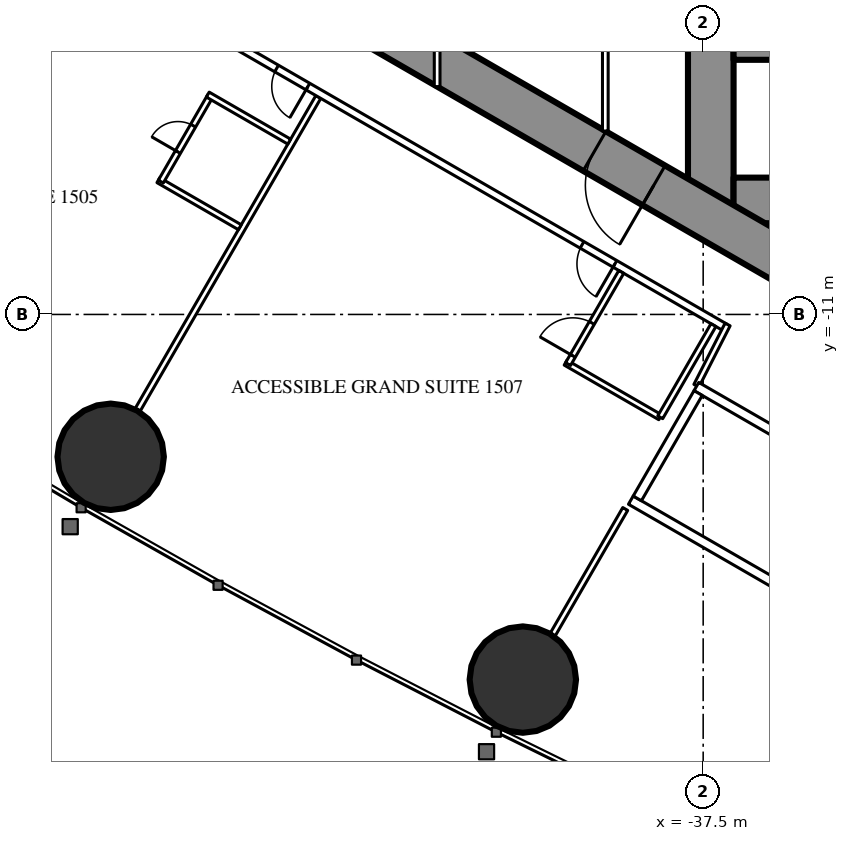
"""IFC4 building model, lengths in metres.
Left out: names, types, materials, properties, quantities, classifications, styles, units other than length and angle.
Written with IfcOpenShell. Run it as: python <this file> out.ifc"""

import sys

from ifc_helpers import new_model, si_unit, direction, frame, frame_2d, origin, origin_2d, place, context, subcontext, project, spatial, rectangle, hollow_circle, extrude, element, fill, save


model = new_model("IFC4")
c1 = context("Model", 3, precision=1e-05, world=origin(), true_north=direction((0.0, 1.0)))
c2 = subcontext(c1, "Body", "Model", "MODEL_VIEW")
j1 = project(units=[si_unit("LENGTHUNIT", "METRE"), si_unit("PLANEANGLEUNIT", "RADIAN")], contexts=[c1])
p1 = place(None, origin())
s1 = spatial("IfcSite", under=j1, at=p1, CompositionType="ELEMENT")
p2 = place(p1, origin())
s2 = spatial("IfcBuilding", under=s1, at=p2, CompositionType="ELEMENT")
p3 = place(p2, frame((0.0, 0.0, 60.0)))
s3 = spatial("IfcBuildingStorey", under=s2, at=p3, CompositionType="ELEMENT", Elevation=60.0)
for number, where, z_axis, x_axis in (
    (1, (-53.09, -14.745, 0.0), (0.0, 0.0, 1.0), (1.0, 0.0, 0.0)),
    (2, (-42.245, -20.607, 0.0), (0.0, 0.0, 1.0), (1.0, 0.0, 0.0)),
):
    element("IfcColumn", number, at=place(p3, frame(where, z_axis=z_axis, x_axis=x_axis)), inside=s3, PredefinedType="COLUMN", context=c2, shape_type="SweptSolid", body=[
        extrude(hollow_circle(Radius=1.4, WallThickness=0.12, at=origin_2d()), origin(), (0.0, 0.0, 1.0), 3.5),
    ])
p4 = place(p3, frame((-37.3, 8.6, 0.0), z_axis=(0.0, 0.0, 1.0), x_axis=(0.0, -1.0, 0.0)))
e3 = element("IfcWall", 3, at=p4, inside=s3, PredefinedType="SHEAR", context=c2, shape_type="SweptSolid", body=[
    extrude(rectangle(XDim=17.2, YDim=1.2, at=frame_2d((8.6, 0.0))), origin(), (0.0, 0.0, 1.0), 3.5),
])
p5 = place(p4, frame((7.7, 0.0, 0.0)))
e4 = element("IfcOpeningElement", 4, at=p5, cuts=e3, PredefinedType="OPENING", context=c2, shape_type="SweptSolid", body=[
    extrude(rectangle(XDim=1.8, YDim=2.2, at=frame_2d((0.9, 1.1))), frame((0.0, 0.61, 0.0), z_axis=(0.0, -1.0, 0.0), x_axis=(1.0, 0.0, 0.0)), (0.0, 0.0, 1.0), 1.22),
])
p6 = place(p3, frame((-28.3, -8.0, 0.0), z_axis=(0.0, 0.0, 1.0), x_axis=(-1.0, 0.0, 0.0)))
e5 = element("IfcWall", 5, at=p6, inside=s3, PredefinedType="SHEAR", context=c2, shape_type="SweptSolid", body=[
    extrude(rectangle(XDim=8.4, YDim=1.2, at=frame_2d((4.2, 0.0))), origin(), (0.0, 0.0, 1.0), 3.5),
])
p7 = place(p6, frame((0.25, 0.0, 0.0)))
e6 = element("IfcOpeningElement", 6, at=p7, cuts=e5, PredefinedType="OPENING", context=c2, shape_type="SweptSolid", body=[
    extrude(rectangle(XDim=1.0, YDim=2.2, at=frame_2d((0.5, 1.1))), frame((0.0, 0.61, 0.0), z_axis=(0.0, -1.0, 0.0), x_axis=(1.0, 0.0, 0.0)), (0.0, 0.0, 1.0), 1.22),
])
p8 = place(p3, frame((-28.3, -4.15, 0.0), z_axis=(0.0, 0.0, 1.0), x_axis=(-1.0, 0.0, 0.0)))
e7 = element("IfcWall", 7, at=p8, inside=s3, PredefinedType="SHEAR", context=c2, shape_type="SweptSolid", body=[
    extrude(rectangle(XDim=8.4, YDim=0.3, at=frame_2d((4.2, 0.0))), origin(), (0.0, 0.0, 1.0), 3.5),
])
p9 = place(p3, frame((-27.2, -14.3, 0.0), z_axis=(0.0, 0.0, 1.0), x_axis=(-0.866024021859, 0.500002393557, 0.0)))
e8 = element("IfcWall", 8, at=p9, inside=s3, PredefinedType="SHEAR", context=c2, shape_type="SweptSolid", body=[
    extrude(rectangle(XDim=27.907, YDim=1.2, at=frame_2d((13.954, 0.0))), origin(), (0.0, 0.0, 1.0), 3.5),
])
p10 = place(p9, frame((4.6, 0.0, 0.0)))
e9 = element("IfcOpeningElement", 9, at=p10, cuts=e8, PredefinedType="OPENING", context=c2, shape_type="SweptSolid", body=[
    extrude(rectangle(XDim=1.0, YDim=2.2, at=frame_2d((0.5, 1.1))), frame((0.0, 0.61, 0.0), z_axis=(0.0, -1.0, 0.0), x_axis=(1.0, 0.0, 0.0)), (0.0, 0.0, 1.0), 1.22),
])
p11 = place(p9, frame((13.395, 0.0, 0.0)))
e10 = element("IfcOpeningElement", 10, at=p11, cuts=e8, PredefinedType="OPENING", context=c2, shape_type="SweptSolid", body=[
    extrude(rectangle(XDim=1.8, YDim=2.2, at=frame_2d((0.9, 1.1))), frame((0.0, 0.61, 0.0), z_axis=(0.0, -1.0, 0.0), x_axis=(1.0, 0.0, 0.0)), (0.0, 0.0, 1.0), 1.22),
])
p12 = place(p3, frame((-47.627, -5.278, 0.0), z_axis=(0.0, 0.0, 1.0), x_axis=(-0.500009844318, -0.86601972009, 0.0)))
e11 = element("IfcWall", 11, at=p12, inside=s3, PredefinedType="PARTITIONING", context=c2, shape_type="SweptSolid", body=[
    extrude(rectangle(XDim=9.51, YDim=0.15, at=frame_2d((4.755, 0.0))), origin(), (0.0, 0.0, 1.0), 2.25),
])
p13 = place(p3, frame((-39.551, -16.118, 0.0), z_axis=(0.0, 0.0, 1.0), x_axis=(-0.499986503906, -0.866033195618, 0.0)))
e12 = element("IfcWall", 12, at=p13, inside=s3, PredefinedType="PARTITIONING", context=c2, shape_type="SweptSolid", body=[
    extrude(rectangle(XDim=3.815, YDim=0.15, at=frame_2d((1.907, 0.0))), origin(), (0.0, 0.0, 1.0), 3.25),
])
p14 = place(p3, frame((-36.92, -11.344, 0.0), z_axis=(0.0, 0.0, 1.0), x_axis=(-0.866028313256, 0.499994960614, 0.0)))
e13 = element("IfcWall", 13, at=p14, inside=s3, PredefinedType="PARTITIONING", context=c2, shape_type="SweptSolid", body=[
    extrude(rectangle(XDim=22.568, YDim=0.2, at=frame_2d((11.284, 0.0))), origin(), (0.0, 0.0, 1.0), 3.25),
])
p15 = place(p14, frame((12.68, 0.0, 0.0)))
e14 = element("IfcOpeningElement", 14, at=p15, cuts=e13, PredefinedType="OPENING", context=c2, shape_type="SweptSolid", body=[
    extrude(rectangle(XDim=0.95, YDim=2.2, at=frame_2d((0.475, 1.1))), frame((0.0, 0.11, 0.0), z_axis=(0.0, -1.0, 0.0), x_axis=(1.0, 0.0, 0.0)), (0.0, 0.0, 1.0), 0.22),
])
p16 = place(p14, frame((3.35, 0.0, 0.0)))
e15 = element("IfcOpeningElement", 15, at=p16, cuts=e13, PredefinedType="OPENING", context=c2, shape_type="SweptSolid", body=[
    extrude(rectangle(XDim=1.0, YDim=2.2, at=frame_2d((0.5, 1.1))), frame((0.0, 0.11, 0.0), z_axis=(0.0, -1.0, 0.0), x_axis=(1.0, 0.0, 0.0)), (0.0, 0.0, 1.0), 0.22),
])
p17 = place(p3, frame((-36.857, -11.265, 0.0), z_axis=(0.0, 0.0, 1.0), x_axis=(-0.454225294761, -0.890886851176, 0.0)))
e16 = element("IfcWall", 16, at=p17, inside=s3, PredefinedType="PARTITIONING", context=c2, shape_type="SweptSolid", body=[
    extrude(rectangle(XDim=1.807, YDim=0.15, at=frame_2d((0.904, 0.0))), origin(), (0.0, 0.0, 1.0), 3.25),
])
p18 = place(p3, frame((-49.692, -8.704, 0.0), z_axis=(0.0, 0.0, 1.0), x_axis=(-0.866073894602, 0.499916002032, 0.0)))
e17 = element("IfcWall", 17, at=p18, inside=s3, PredefinedType="PARTITIONING", context=c2, shape_type="SweptSolid", body=[
    extrude(rectangle(XDim=2.475, YDim=0.15, at=frame_2d((1.238, 0.0))), origin(), (0.0, 0.0, 1.0), 3.25),
])
p19 = place(p3, frame((-50.47, -5.253, 0.0), z_axis=(0.0, 0.0, 1.0), x_axis=(-0.500006934395, -0.866021400173, 0.0)))
e18 = element("IfcWall", 18, at=p19, inside=s3, PredefinedType="PARTITIONING", context=c2, shape_type="SweptSolid", body=[
    extrude(rectangle(XDim=2.6, YDim=0.15, at=frame_2d((1.3, 0.0))), origin(), (0.0, 0.0, 1.0), 3.25),
])
p20 = place(p19, frame((0.9, 0.0, 0.0)))
e19 = element("IfcOpeningElement", 19, at=p20, cuts=e18, PredefinedType="OPENING", context=c2, shape_type="SweptSolid", body=[
    extrude(rectangle(XDim=0.8, YDim=2.2, at=frame_2d((0.4, 1.1))), frame((0.0, 0.085, 0.0), z_axis=(0.0, -1.0, 0.0), x_axis=(1.0, 0.0, 0.0)), (0.0, 0.0, 1.0), 0.17),
])
p21 = place(p3, frame((-48.392, -6.453, 0.0), z_axis=(0.0, 0.0, 1.0), x_axis=(-0.86604923931, 0.499958713387, 0.0)))
e20 = element("IfcWall", 20, at=p21, inside=s3, PredefinedType="PARTITIONING", context=c2, shape_type="SweptSolid", body=[
    extrude(rectangle(XDim=2.475, YDim=0.15, at=frame_2d((1.237, 0.0))), origin(), (0.0, 0.0, 1.0), 3.25),
])
p22 = place(p3, frame((-38.63, -13.705, 0.0), z_axis=(0.0, 0.0, 1.0), x_axis=(-0.866018712932, 0.500011588718, 0.0)))
e21 = element("IfcWall", 21, at=p22, inside=s3, PredefinedType="PARTITIONING", context=c2, shape_type="SweptSolid", body=[
    extrude(rectangle(XDim=2.875, YDim=0.15, at=frame_2d((1.438, 0.0))), origin(), (0.0, 0.0, 1.0), 3.25),
])
p23 = place(p3, frame((-39.655, -9.88, 0.0), z_axis=(0.0, 0.0, 1.0), x_axis=(-0.500049511043, -0.865996816683, 0.0)))
e22 = element("IfcWall", 22, at=p23, inside=s3, PredefinedType="PARTITIONING", context=c2, shape_type="SweptSolid", body=[
    extrude(rectangle(XDim=2.8, YDim=0.15, at=frame_2d((1.4, 0.0))), origin(), (0.0, 0.0, 1.0), 3.25),
])
p24 = place(p23, frame((1.55, 0.0, 0.0)))
e23 = element("IfcOpeningElement", 23, at=p24, cuts=e22, PredefinedType="OPENING", context=c2, shape_type="SweptSolid", body=[
    extrude(rectangle(XDim=1.0, YDim=2.2, at=frame_2d((0.5, 1.1))), frame((0.0, 0.085, 0.0), z_axis=(0.0, -1.0, 0.0), x_axis=(1.0, 0.0, 0.0)), (0.0, 0.0, 1.0), 0.17),
])
p25 = place(p3, frame((-37.23, -11.281, 0.0), z_axis=(0.0, 0.0, 1.0), x_axis=(-0.500049511043, -0.865996816683, 0.0)))
e24 = element("IfcWall", 24, at=p25, inside=s3, PredefinedType="PARTITIONING", context=c2, shape_type="SweptSolid", body=[
    extrude(rectangle(XDim=2.8, YDim=0.15, at=frame_2d((1.4, 0.0))), origin(), (0.0, 0.0, 1.0), 3.25),
])
p26 = place(p3, frame((-40.075, 1.2, 0.0), z_axis=(0.0, 0.0, 1.0), x_axis=(0.0, -1.0, 0.0)))
e25 = element("IfcWall", 25, at=p26, inside=s3, PredefinedType="PARTITIONING", context=c2, shape_type="SweptSolid", body=[
    extrude(rectangle(XDim=7.374, YDim=0.15, at=frame_2d((3.687, 0.0))), origin(), (0.0, 0.0, 1.0), 3.25),
])
p27 = place(p26, frame((2.787, 0.0, 0.0)))
e26 = element("IfcOpeningElement", 26, at=p27, cuts=e25, PredefinedType="OPENING", context=c2, shape_type="SweptSolid", body=[
    extrude(rectangle(XDim=1.8, YDim=2.2, at=frame_2d((0.9, 1.1))), frame((0.0, 0.085, 0.0), z_axis=(0.0, -1.0, 0.0), x_axis=(1.0, 0.0, 0.0)), (0.0, 0.0, 1.0), 0.17),
])
p28 = place(p3, frame((-44.5, 5.005, 0.0), z_axis=(0.0, 0.0, 1.0), x_axis=(0.0, -1.0, 0.0)))
e27 = element("IfcWall", 27, at=p28, inside=s3, PredefinedType="PARTITIONING", context=c2, shape_type="SweptSolid", body=[
    extrude(rectangle(XDim=10.009, YDim=0.15, at=frame_2d((5.005, 0.0))), origin(), (0.0, 0.0, 1.0), 2.45),
])
p29 = place(p28, frame((4.505, 0.0, 0.0)))
e28 = element("IfcOpeningElement", 28, at=p29, cuts=e27, PredefinedType="OPENING", context=c2, shape_type="SweptSolid", body=[
    extrude(rectangle(XDim=1.0, YDim=2.2, at=frame_2d((0.5, 1.1))), frame((0.0, 0.085, 0.0), z_axis=(0.0, -1.0, 0.0), x_axis=(1.0, 0.0, 0.0)), (0.0, 0.0, 1.0), 0.17),
])
p30 = place(p3, frame((-33.696, -15.197, 0.0), z_axis=(0.0, 0.0, 1.0), x_axis=(-0.865976953817, 0.500083908417, 0.0)))
e29 = element("IfcWall", 29, at=p30, inside=s3, PredefinedType="PARTITIONING", context=c2, shape_type="SweptSolid", body=[
    extrude(rectangle(XDim=4.599, YDim=0.25, at=frame_2d((2.3, 0.0))), origin(), (0.0, 0.0, 1.0), 3.25),
])
p31 = place(p3, frame((-35.42, -18.186, 0.0), z_axis=(0.0, 0.0, 1.0), x_axis=(-0.865990227814, 0.50006092162, 0.0)))
e30 = element("IfcWall", 30, at=p31, inside=s3, PredefinedType="PARTITIONING", context=c2, shape_type="SweptSolid", body=[
    extrude(rectangle(XDim=4.6, YDim=0.25, at=frame_2d((2.3, 0.0))), origin(), (0.0, 0.0, 1.0), 3.25),
])
p32 = place(p3, frame((-37.633, -13.068, 0.0), z_axis=(0.0, 0.0, 1.0), x_axis=(-0.499872130319, -0.866099216793, 0.0)))
e31 = element("IfcWall", 31, at=p32, inside=s3, PredefinedType="PARTITIONING", context=c2, shape_type="SweptSolid", body=[
    extrude(rectangle(XDim=3.2, YDim=0.25, at=frame_2d((1.6, 0.0))), origin(), (0.0, 0.0, 1.0), 3.25),
])
p33 = place(p20, origin())
e32 = element("IfcDoor", 32, at=p33, inside=s3, OperationType="SINGLE_SWING_RIGHT", PredefinedType="DOOR", context=c2, shape_type="SweptSolid", body=[
    extrude(rectangle(XDim=0.8, YDim=2.2, at=frame_2d((0.4, 1.1))), frame((0.0, 0.025, 0.0), z_axis=(0.0, -1.0, 0.0), x_axis=(1.0, 0.0, 0.0)), (0.0, 0.0, 1.0), 0.05),
])
fill(e19, e32)
p34 = place(p15, origin())
e33 = element("IfcDoor", 33, at=p34, inside=s3, OperationType="SINGLE_SWING_LEFT", PredefinedType="DOOR", context=c2, shape_type="SweptSolid", body=[
    extrude(rectangle(XDim=0.95, YDim=2.2, at=frame_2d((0.475, 1.1))), frame((0.0, 0.025, 0.0), z_axis=(0.0, -1.0, 0.0), x_axis=(1.0, 0.0, 0.0)), (0.0, 0.0, 1.0), 0.05),
])
fill(e14, e33)
p35 = place(p24, origin())
e34 = element("IfcDoor", 34, at=p35, inside=s3, OperationType="SINGLE_SWING_RIGHT", PredefinedType="DOOR", context=c2, shape_type="SweptSolid", body=[
    extrude(rectangle(XDim=1.0, YDim=2.2, at=frame_2d((0.5, 1.1))), frame((0.0, 0.025, 0.0), z_axis=(0.0, -1.0, 0.0), x_axis=(1.0, 0.0, 0.0)), (0.0, 0.0, 1.0), 0.05),
])
fill(e23, e34)
p36 = place(p16, origin())
e35 = element("IfcDoor", 35, at=p36, inside=s3, OperationType="SINGLE_SWING_LEFT", PredefinedType="DOOR", context=c2, shape_type="SweptSolid", body=[
    extrude(rectangle(XDim=1.0, YDim=2.2, at=frame_2d((0.5, 1.1))), frame((0.0, 0.025, 0.0), z_axis=(0.0, -1.0, 0.0), x_axis=(1.0, 0.0, 0.0)), (0.0, 0.0, 1.0), 0.05),
])
fill(e15, e35)
p37 = place(p11, origin())
e36 = element("IfcDoor", 36, at=p37, inside=s3, OperationType="DOUBLE_DOOR_SINGLE_SWING", PredefinedType="DOOR", context=c2, shape_type="SweptSolid", body=[
    extrude(rectangle(XDim=1.8, YDim=2.2, at=frame_2d((0.9, 1.1))), frame((0.0, 0.025, 0.0), z_axis=(0.0, -1.0, 0.0), x_axis=(1.0, 0.0, 0.0)), (0.0, 0.0, 1.0), 0.05),
])
fill(e10, e36)
save(model, sys.argv[1])
